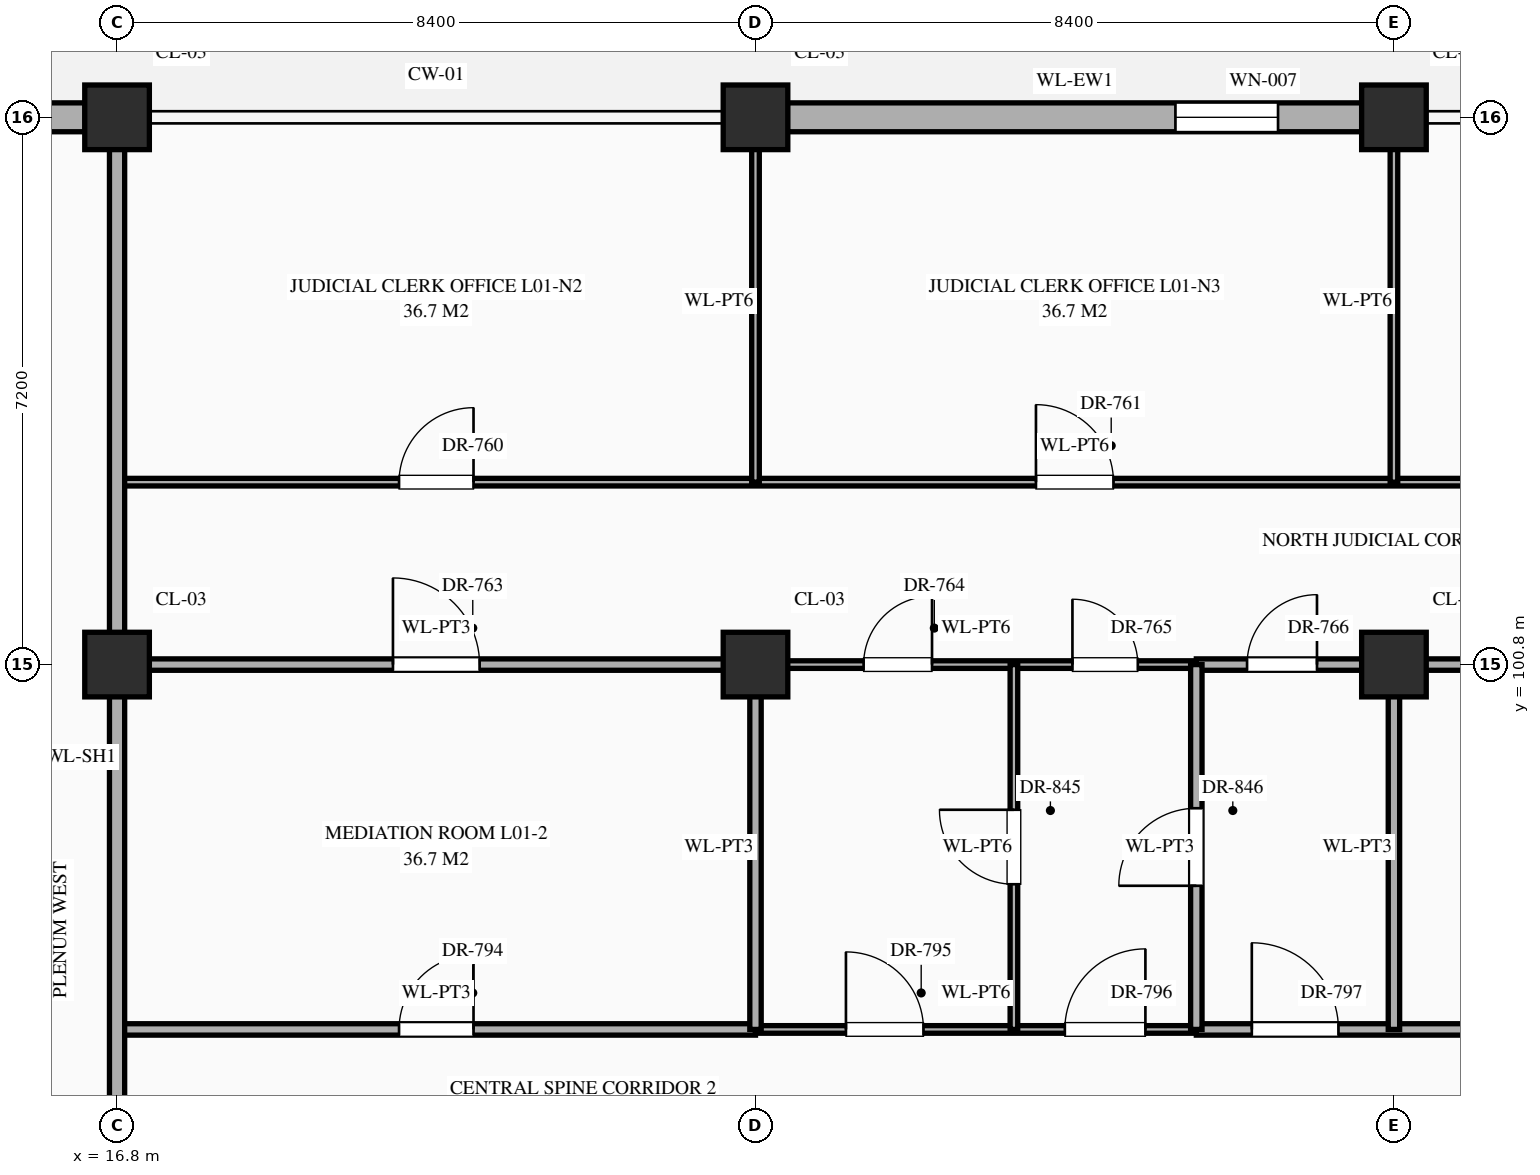
"""IFC4 building model, lengths in metres.
Left out: names, types, materials, properties, quantities, classifications, styles, units other than length and angle.
Written with IfcOpenShell. Run it as: python <this file> out.ifc"""

import sys

from ifc_helpers import new_model, si_unit, direction, frame, frame_2d, origin, origin_2d, place, context, subcontext, project, spatial, rectangle, extrude, element, fill, save


model = new_model("IFC4")
c1 = context("Model", 3, precision=1e-05, world=origin(), true_north=direction((0.0, 1.0)))
c2 = subcontext(c1, "Body", "Model", "MODEL_VIEW")
j1 = project(units=[si_unit("LENGTHUNIT", "METRE"), si_unit("PLANEANGLEUNIT", "RADIAN")], contexts=[c1])
p1 = place(None, origin())
s1 = spatial("IfcSite", under=j1, at=p1, CompositionType="ELEMENT")
p2 = place(p1, origin())
s2 = spatial("IfcBuilding", under=s1, at=p2, CompositionType="ELEMENT")
p3 = place(p2, origin())
s3 = spatial("IfcBuildingStorey", under=s2, at=p3, CompositionType="ELEMENT", Elevation=0.0)
for number, where, z_axis, x_axis in (
    (1, (16.8, 100.8, 0.0), (0.0, 0.0, 1.0), (1.0, 0.0, 0.0)),
    (2, (16.8, 108.0, 0.0), (0.0, 0.0, 1.0), (1.0, 0.0, 0.0)),
    (3, (25.2, 100.8, 0.0), (0.0, 0.0, 1.0), (1.0, 0.0, 0.0)),
    (4, (25.2, 108.0, 0.0), (0.0, 0.0, 1.0), (1.0, 0.0, 0.0)),
    (5, (33.6, 100.8, 0.0), (0.0, 0.0, 1.0), (1.0, 0.0, 0.0)),
    (6, (33.6, 108.0, 0.0), (0.0, 0.0, 1.0), (1.0, 0.0, 0.0)),
):
    element("IfcColumn", number, at=place(p3, frame(where, z_axis=z_axis, x_axis=x_axis)), inside=s3, PredefinedType="COLUMN", context=c2, shape_type="SweptSolid", body=[
        extrude(rectangle(XDim=0.85, YDim=0.85, at=origin_2d()), origin(), (0.0, 0.0, 1.0), 5.4),
    ])
p4 = place(p3, frame((8.82, 108.0, 0.0), z_axis=(0.0, 0.0, 1.0), x_axis=(1.0, 0.0, 0.0)))
e7 = element("IfcWall", 7, at=p4, inside=s3, PredefinedType="STANDARD", context=c2, shape_type="SweptSolid", body=[
    extrude(rectangle(XDim=7.56, YDim=0.38, at=frame_2d((3.78, 0.0))), origin(), (0.0, 0.0, 1.0), 4.47),
])
p5 = place(p4, frame((1.68, 0.0, 0.0)))
e8 = element("IfcOpeningElement", 8, at=p5, cuts=e7, PredefinedType="OPENING", context=c2, shape_type="SweptSolid", body=[
    extrude(rectangle(XDim=4.2, YDim=3.6, at=frame_2d((2.1, 1.8))), frame((0.0, 0.202, 0.0), z_axis=(0.0, -1.0, 0.0), x_axis=(1.0, 0.0, 0.0)), (0.0, 0.0, 1.0), 0.404),
])
p6 = place(p3, frame((25.62, 108.0, 0.0), z_axis=(0.0, 0.0, 1.0), x_axis=(1.0, 0.0, 0.0)))
e9 = element("IfcWall", 9, at=p6, inside=s3, PredefinedType="STANDARD", context=c2, shape_type="SweptSolid", body=[
    extrude(rectangle(XDim=7.56, YDim=0.38, at=frame_2d((3.78, 0.0))), origin(), (0.0, 0.0, 1.0), 4.47),
])
p7 = place(p6, frame((5.105, 0.0, 0.85)))
e10 = element("IfcOpeningElement", 10, at=p7, cuts=e9, PredefinedType="OPENING", context=c2, shape_type="SweptSolid", body=[
    extrude(rectangle(XDim=1.35, YDim=1.56, at=frame_2d((0.675, 0.78))), frame((0.0, 0.202, 0.0), z_axis=(0.0, -1.0, 0.0), x_axis=(1.0, 0.0, 0.0)), (0.0, 0.0, 1.0), 0.404),
])
p8 = place(p3, frame((16.8, 96.0, 0.0), z_axis=(0.0, 0.0, 1.0), x_axis=(1.0, 0.0, 0.0)))
e11 = element("IfcWall", 11, at=p8, inside=s3, PredefinedType="STANDARD", context=c2, shape_type="SweptSolid", body=[
    extrude(rectangle(XDim=8.4, YDim=0.15, at=frame_2d((4.2, 0.0))), origin(), (0.0, 0.0, 1.0), 5.12),
])
p9 = place(p8, frame((3.71, 0.0, 0.0)))
e12 = element("IfcOpeningElement", 12, at=p9, cuts=e11, PredefinedType="OPENING", context=c2, shape_type="SweptSolid", body=[
    extrude(rectangle(XDim=0.98, YDim=2.35, at=frame_2d((0.49, 1.175))), frame((0.0, 0.087, 0.0), z_axis=(0.0, -1.0, 0.0), x_axis=(1.0, 0.0, 0.0)), (0.0, 0.0, 1.0), 0.174),
])
p10 = place(p3, frame((25.2, 96.0, 0.0), z_axis=(0.0, 0.0, 1.0), x_axis=(1.0, 0.0, 0.0)))
e13 = element("IfcWall", 13, at=p10, inside=s3, PredefinedType="STANDARD", context=c2, shape_type="SweptSolid", body=[
    extrude(rectangle(XDim=5.8, YDim=0.1, at=frame_2d((2.9, 0.0))), origin(), (0.0, 0.0, 1.0), 5.12),
])
p11 = place(p10, frame((1.19, 0.0, 0.0)))
e14 = element("IfcOpeningElement", 14, at=p11, cuts=e13, PredefinedType="OPENING", context=c2, shape_type="SweptSolid", body=[
    extrude(rectangle(XDim=1.02, YDim=2.4, at=frame_2d((0.51, 1.2))), frame((0.0, 0.062, 0.0), z_axis=(0.0, -1.0, 0.0), x_axis=(1.0, 0.0, 0.0)), (0.0, 0.0, 1.0), 0.124),
])
p12 = place(p10, frame((4.07, 0.0, 0.0)))
e15 = element("IfcOpeningElement", 15, at=p12, cuts=e13, PredefinedType="OPENING", context=c2, shape_type="SweptSolid", body=[
    extrude(rectangle(XDim=1.06, YDim=2.4, at=frame_2d((0.53, 1.2))), frame((0.0, 0.062, 0.0), z_axis=(0.0, -1.0, 0.0), x_axis=(1.0, 0.0, 0.0)), (0.0, 0.0, 1.0), 0.124),
])
p13 = place(p3, frame((31.0, 96.0, 0.0), z_axis=(0.0, 0.0, 1.0), x_axis=(1.0, 0.0, 0.0)))
e16 = element("IfcWall", 16, at=p13, inside=s3, PredefinedType="STANDARD", context=c2, shape_type="SweptSolid", body=[
    extrude(rectangle(XDim=19.4, YDim=0.15, at=frame_2d((9.7, 0.0))), origin(), (0.0, 0.0, 1.0), 5.12),
])
p14 = place(p13, frame((0.73, 0.0, 0.0)))
e17 = element("IfcOpeningElement", 17, at=p14, cuts=e16, PredefinedType="OPENING", context=c2, shape_type="SweptSolid", body=[
    extrude(rectangle(XDim=1.14, YDim=2.4, at=frame_2d((0.57, 1.2))), frame((0.0, 0.087, 0.0), z_axis=(0.0, -1.0, 0.0), x_axis=(1.0, 0.0, 0.0)), (0.0, 0.0, 1.0), 0.174),
])
p15 = place(p13, frame((6.35, 0.0, 0.0)))
e18 = element("IfcOpeningElement", 18, at=p15, cuts=e16, PredefinedType="OPENING", context=c2, shape_type="SweptSolid", body=[
    extrude(rectangle(XDim=0.9, YDim=2.15, at=frame_2d((0.45, 1.075))), frame((0.0, 0.087, 0.0), z_axis=(0.0, -1.0, 0.0), x_axis=(1.0, 0.0, 0.0)), (0.0, 0.0, 1.0), 0.174),
])
p16 = place(p13, frame((14.77, 0.0, 0.0)))
e19 = element("IfcOpeningElement", 19, at=p16, cuts=e16, PredefinedType="OPENING", context=c2, shape_type="SweptSolid", body=[
    extrude(rectangle(XDim=0.86, YDim=2.1, at=frame_2d((0.43, 1.05))), frame((0.0, 0.087, 0.0), z_axis=(0.0, -1.0, 0.0), x_axis=(1.0, 0.0, 0.0)), (0.0, 0.0, 1.0), 0.174),
])
p17 = place(p3, frame((16.8, 100.8, 0.0), z_axis=(0.0, 0.0, 1.0), x_axis=(1.0, 0.0, 0.0)))
e20 = element("IfcWall", 20, at=p17, inside=s3, PredefinedType="STANDARD", context=c2, shape_type="SweptSolid", body=[
    extrude(rectangle(XDim=8.4, YDim=0.15, at=frame_2d((4.2, 0.0))), origin(), (0.0, 0.0, 1.0), 4.27),
])
p18 = place(p17, frame((3.63, 0.0, 0.0)))
e21 = element("IfcOpeningElement", 21, at=p18, cuts=e20, PredefinedType="OPENING", context=c2, shape_type="SweptSolid", body=[
    extrude(rectangle(XDim=1.14, YDim=2.4, at=frame_2d((0.57, 1.2))), frame((0.0, 0.087, 0.0), z_axis=(0.0, -1.0, 0.0), x_axis=(1.0, 0.0, 0.0)), (0.0, 0.0, 1.0), 0.174),
])
p19 = place(p3, frame((25.2, 100.8, 0.0), z_axis=(0.0, 0.0, 1.0), x_axis=(1.0, 0.0, 0.0)))
e22 = element("IfcWall", 22, at=p19, inside=s3, PredefinedType="STANDARD", context=c2, shape_type="SweptSolid", body=[
    extrude(rectangle(XDim=5.8, YDim=0.1, at=frame_2d((2.9, 0.0))), origin(), (0.0, 0.0, 1.0), 4.27),
])
p20 = place(p19, frame((1.423, 0.0, 0.0)))
e23 = element("IfcOpeningElement", 23, at=p20, cuts=e22, PredefinedType="OPENING", context=c2, shape_type="SweptSolid", body=[
    extrude(rectangle(XDim=0.9, YDim=2.15, at=frame_2d((0.45, 1.075))), frame((0.0, 0.062, 0.0), z_axis=(0.0, -1.0, 0.0), x_axis=(1.0, 0.0, 0.0)), (0.0, 0.0, 1.0), 0.124),
])
p21 = place(p19, frame((4.17, 0.0, 0.0)))
e24 = element("IfcOpeningElement", 24, at=p21, cuts=e22, PredefinedType="OPENING", context=c2, shape_type="SweptSolid", body=[
    extrude(rectangle(XDim=0.86, YDim=2.1, at=frame_2d((0.43, 1.05))), frame((0.0, 0.062, 0.0), z_axis=(0.0, -1.0, 0.0), x_axis=(1.0, 0.0, 0.0)), (0.0, 0.0, 1.0), 0.124),
])
p22 = place(p3, frame((31.0, 100.8, 0.0), z_axis=(0.0, 0.0, 1.0), x_axis=(1.0, 0.0, 0.0)))
e25 = element("IfcWall", 25, at=p22, inside=s3, PredefinedType="STANDARD", context=c2, shape_type="SweptSolid", body=[
    extrude(rectangle(XDim=11.0, YDim=0.15, at=frame_2d((5.5, 0.0))), origin(), (0.0, 0.0, 1.0), 4.27),
])
p23 = place(p22, frame((0.667, 0.0, 0.0)))
e26 = element("IfcOpeningElement", 26, at=p23, cuts=e25, PredefinedType="OPENING", context=c2, shape_type="SweptSolid", body=[
    extrude(rectangle(XDim=0.92, YDim=2.15, at=frame_2d((0.46, 1.075))), frame((0.0, 0.087, 0.0), z_axis=(0.0, -1.0, 0.0), x_axis=(1.0, 0.0, 0.0)), (0.0, 0.0, 1.0), 0.174),
])
p24 = place(p22, frame((6.32, 0.0, 0.0)))
e27 = element("IfcOpeningElement", 27, at=p24, cuts=e25, PredefinedType="OPENING", context=c2, shape_type="SweptSolid", body=[
    extrude(rectangle(XDim=0.96, YDim=2.2, at=frame_2d((0.48, 1.1))), frame((0.0, 0.087, 0.0), z_axis=(0.0, -1.0, 0.0), x_axis=(1.0, 0.0, 0.0)), (0.0, 0.0, 1.0), 0.174),
])
p25 = place(p3, frame((16.8, 103.2, 0.0), z_axis=(0.0, 0.0, 1.0), x_axis=(1.0, 0.0, 0.0)))
e28 = element("IfcWall", 28, at=p25, inside=s3, PredefinedType="STANDARD", context=c2, shape_type="SweptSolid", body=[
    extrude(rectangle(XDim=25.2, YDim=0.1, at=frame_2d((12.6, 0.0))), origin(), (0.0, 0.0, 1.0), 5.12),
])
p26 = place(p25, frame((3.71, 0.0, 0.0)))
e29 = element("IfcOpeningElement", 29, at=p26, cuts=e28, PredefinedType="OPENING", context=c2, shape_type="SweptSolid", body=[
    extrude(rectangle(XDim=0.98, YDim=2.35, at=frame_2d((0.49, 1.175))), frame((0.0, 0.062, 0.0), z_axis=(0.0, -1.0, 0.0), x_axis=(1.0, 0.0, 0.0)), (0.0, 0.0, 1.0), 0.124),
])
p27 = place(p25, frame((12.09, 0.0, 0.0)))
e30 = element("IfcOpeningElement", 30, at=p27, cuts=e28, PredefinedType="OPENING", context=c2, shape_type="SweptSolid", body=[
    extrude(rectangle(XDim=1.02, YDim=2.4, at=frame_2d((0.51, 1.2))), frame((0.0, 0.062, 0.0), z_axis=(0.0, -1.0, 0.0), x_axis=(1.0, 0.0, 0.0)), (0.0, 0.0, 1.0), 0.124),
])
p28 = place(p25, frame((20.47, 0.0, 0.0)))
e31 = element("IfcOpeningElement", 31, at=p28, cuts=e28, PredefinedType="OPENING", context=c2, shape_type="SweptSolid", body=[
    extrude(rectangle(XDim=1.06, YDim=2.4, at=frame_2d((0.53, 1.2))), frame((0.0, 0.062, 0.0), z_axis=(0.0, -1.0, 0.0), x_axis=(1.0, 0.0, 0.0)), (0.0, 0.0, 1.0), 0.124),
])
p29 = place(p3, frame((16.8, 91.2, 0.0), z_axis=(0.0, 0.0, 1.0), x_axis=(0.0, 1.0, 0.0)))
e32 = element("IfcWall", 32, at=p29, inside=s3, PredefinedType="STANDARD", context=c2, shape_type="SweptSolid", body=[
    extrude(rectangle(XDim=16.76, YDim=0.2, at=frame_2d((8.38, 0.0))), origin(), (0.0, 0.0, 1.0), 4.37),
])
p30 = place(p3, frame((25.2, 96.0, 0.0), z_axis=(0.0, 0.0, 1.0), x_axis=(0.0, 1.0, 0.0)))
e33 = element("IfcWall", 33, at=p30, inside=s3, PredefinedType="STANDARD", context=c2, shape_type="SweptSolid", body=[
    extrude(rectangle(XDim=4.8, YDim=0.15, at=frame_2d((2.4, 0.0))), origin(), (0.0, 0.0, 1.0), 4.37),
])
p31 = place(p3, frame((25.2, 103.2, 0.0), z_axis=(0.0, 0.0, 1.0), x_axis=(0.0, 1.0, 0.0)))
e34 = element("IfcWall", 34, at=p31, inside=s3, PredefinedType="STANDARD", context=c2, shape_type="SweptSolid", body=[
    extrude(rectangle(XDim=4.76, YDim=0.1, at=frame_2d((2.38, 0.0))), origin(), (0.0, 0.0, 1.0), 4.37),
])
p32 = place(p3, frame((28.6, 96.0, 0.0), z_axis=(0.0, 0.0, 1.0), x_axis=(0.0, 1.0, 0.0)))
e35 = element("IfcWall", 35, at=p32, inside=s3, PredefinedType="STANDARD", context=c2, shape_type="SweptSolid", body=[
    extrude(rectangle(XDim=4.8, YDim=0.1, at=frame_2d((2.4, 0.0))), origin(), (0.0, 0.0, 1.0), 5.12),
])
p33 = place(p32, frame((1.91, 0.0, 0.0)))
e36 = element("IfcOpeningElement", 36, at=p33, cuts=e35, PredefinedType="OPENING", context=c2, shape_type="SweptSolid", body=[
    extrude(rectangle(XDim=0.98, YDim=2.35, at=frame_2d((0.49, 1.175))), frame((0.0, 0.062, 0.0), z_axis=(0.0, -1.0, 0.0), x_axis=(1.0, 0.0, 0.0)), (0.0, 0.0, 1.0), 0.124),
])
p34 = place(p3, frame((31.0, 96.0, 0.0), z_axis=(0.0, 0.0, 1.0), x_axis=(0.0, 1.0, 0.0)))
e37 = element("IfcWall", 37, at=p34, inside=s3, PredefinedType="STANDARD", context=c2, shape_type="SweptSolid", body=[
    extrude(rectangle(XDim=4.8, YDim=0.15, at=frame_2d((2.4, 0.0))), origin(), (0.0, 0.0, 1.0), 5.12),
])
p35 = place(p34, frame((1.89, 0.0, 0.0)))
e38 = element("IfcOpeningElement", 38, at=p35, cuts=e37, PredefinedType="OPENING", context=c2, shape_type="SweptSolid", body=[
    extrude(rectangle(XDim=1.02, YDim=2.4, at=frame_2d((0.51, 1.2))), frame((0.0, 0.087, 0.0), z_axis=(0.0, -1.0, 0.0), x_axis=(1.0, 0.0, 0.0)), (0.0, 0.0, 1.0), 0.174),
])
p36 = place(p3, frame((33.6, 96.0, 0.0), z_axis=(0.0, 0.0, 1.0), x_axis=(0.0, 1.0, 0.0)))
e39 = element("IfcWall", 39, at=p36, inside=s3, PredefinedType="STANDARD", context=c2, shape_type="SweptSolid", body=[
    extrude(rectangle(XDim=4.8, YDim=0.15, at=frame_2d((2.4, 0.0))), origin(), (0.0, 0.0, 1.0), 4.37),
])
p37 = place(p3, frame((33.6, 103.2, 0.0), z_axis=(0.0, 0.0, 1.0), x_axis=(0.0, 1.0, 0.0)))
e40 = element("IfcWall", 40, at=p37, inside=s3, PredefinedType="STANDARD", context=c2, shape_type="SweptSolid", body=[
    extrude(rectangle(XDim=4.76, YDim=0.1, at=frame_2d((2.38, 0.0))), origin(), (0.0, 0.0, 1.0), 4.37),
])
p38 = place(p7, origin())
e41 = element("IfcWindow", 41, at=p38, inside=s3, PartitioningType="SINGLE_PANEL", PredefinedType="WINDOW", context=c2, shape_type="SweptSolid", body=[
    extrude(rectangle(XDim=1.35, YDim=1.56, at=frame_2d((0.675, 0.78))), frame((0.0, 0.03, 0.0), z_axis=(0.0, -1.0, 0.0), x_axis=(1.0, 0.0, 0.0)), (0.0, 0.0, 1.0), 0.06),
])
fill(e10, e41)
p39 = place(p26, origin())
e42 = element("IfcDoor", 42, at=p39, inside=s3, OperationType="SINGLE_SWING_RIGHT", PredefinedType="DOOR", context=c2, shape_type="SweptSolid", body=[
    extrude(rectangle(XDim=0.98, YDim=2.35, at=frame_2d((0.49, 1.175))), frame((0.0, 0.025, 0.0), z_axis=(0.0, -1.0, 0.0), x_axis=(1.0, 0.0, 0.0)), (0.0, 0.0, 1.0), 0.05),
])
fill(e29, e42)
p40 = place(p27, origin())
e43 = element("IfcDoor", 43, at=p40, inside=s3, OperationType="SINGLE_SWING_LEFT", PredefinedType="DOOR", context=c2, shape_type="SweptSolid", body=[
    extrude(rectangle(XDim=1.02, YDim=2.4, at=frame_2d((0.51, 1.2))), frame((0.0, 0.025, 0.0), z_axis=(0.0, -1.0, 0.0), x_axis=(1.0, 0.0, 0.0)), (0.0, 0.0, 1.0), 0.05),
])
fill(e30, e43)
p41 = place(p18, origin())
e44 = element("IfcDoor", 44, at=p41, inside=s3, OperationType="SINGLE_SWING_LEFT", PredefinedType="DOOR", context=c2, shape_type="SweptSolid", body=[
    extrude(rectangle(XDim=1.14, YDim=2.4, at=frame_2d((0.57, 1.2))), frame((0.0, 0.025, 0.0), z_axis=(0.0, -1.0, 0.0), x_axis=(1.0, 0.0, 0.0)), (0.0, 0.0, 1.0), 0.05),
])
fill(e21, e44)
p42 = place(p20, origin())
e45 = element("IfcDoor", 45, at=p42, inside=s3, OperationType="SINGLE_SWING_RIGHT", PredefinedType="DOOR", context=c2, shape_type="SweptSolid", body=[
    extrude(rectangle(XDim=0.9, YDim=2.15, at=frame_2d((0.45, 1.075))), frame((0.0, 0.025, 0.0), z_axis=(0.0, -1.0, 0.0), x_axis=(1.0, 0.0, 0.0)), (0.0, 0.0, 1.0), 0.05),
])
fill(e23, e45)
p43 = place(p21, origin())
e46 = element("IfcDoor", 46, at=p43, inside=s3, OperationType="SINGLE_SWING_LEFT", PredefinedType="DOOR", context=c2, shape_type="SweptSolid", body=[
    extrude(rectangle(XDim=0.86, YDim=2.1, at=frame_2d((0.43, 1.05))), frame((0.0, 0.025, 0.0), z_axis=(0.0, -1.0, 0.0), x_axis=(1.0, 0.0, 0.0)), (0.0, 0.0, 1.0), 0.05),
])
fill(e24, e46)
p44 = place(p23, origin())
e47 = element("IfcDoor", 47, at=p44, inside=s3, OperationType="SINGLE_SWING_RIGHT", PredefinedType="DOOR", context=c2, shape_type="SweptSolid", body=[
    extrude(rectangle(XDim=0.92, YDim=2.15, at=frame_2d((0.46, 1.075))), frame((0.0, 0.025, 0.0), z_axis=(0.0, -1.0, 0.0), x_axis=(1.0, 0.0, 0.0)), (0.0, 0.0, 1.0), 0.05),
])
fill(e26, e47)
p45 = place(p9, origin())
e48 = element("IfcDoor", 48, at=p45, inside=s3, OperationType="SINGLE_SWING_RIGHT", PredefinedType="DOOR", context=c2, shape_type="SweptSolid", body=[
    extrude(rectangle(XDim=0.98, YDim=2.35, at=frame_2d((0.49, 1.175))), frame((0.0, 0.025, 0.0), z_axis=(0.0, -1.0, 0.0), x_axis=(1.0, 0.0, 0.0)), (0.0, 0.0, 1.0), 0.05),
])
fill(e12, e48)
p46 = place(p11, origin())
e49 = element("IfcDoor", 49, at=p46, inside=s3, OperationType="SINGLE_SWING_LEFT", PredefinedType="DOOR", context=c2, shape_type="SweptSolid", body=[
    extrude(rectangle(XDim=1.02, YDim=2.4, at=frame_2d((0.51, 1.2))), frame((0.0, 0.025, 0.0), z_axis=(0.0, -1.0, 0.0), x_axis=(1.0, 0.0, 0.0)), (0.0, 0.0, 1.0), 0.05),
])
fill(e14, e49)
p47 = place(p12, origin())
e50 = element("IfcDoor", 50, at=p47, inside=s3, OperationType="SINGLE_SWING_RIGHT", PredefinedType="DOOR", context=c2, shape_type="SweptSolid", body=[
    extrude(rectangle(XDim=1.06, YDim=2.4, at=frame_2d((0.53, 1.2))), frame((0.0, 0.025, 0.0), z_axis=(0.0, -1.0, 0.0), x_axis=(1.0, 0.0, 0.0)), (0.0, 0.0, 1.0), 0.05),
])
fill(e15, e50)
p48 = place(p14, origin())
e51 = element("IfcDoor", 51, at=p48, inside=s3, OperationType="SINGLE_SWING_LEFT", PredefinedType="DOOR", context=c2, shape_type="SweptSolid", body=[
    extrude(rectangle(XDim=1.14, YDim=2.4, at=frame_2d((0.57, 1.2))), frame((0.0, 0.025, 0.0), z_axis=(0.0, -1.0, 0.0), x_axis=(1.0, 0.0, 0.0)), (0.0, 0.0, 1.0), 0.05),
])
fill(e17, e51)
p49 = place(p33, origin())
e52 = element("IfcDoor", 52, at=p49, inside=s3, OperationType="SINGLE_SWING_RIGHT", PredefinedType="DOOR", context=c2, shape_type="SweptSolid", body=[
    extrude(rectangle(XDim=0.98, YDim=2.35, at=frame_2d((0.49, 1.175))), frame((0.0, 0.025, 0.0), z_axis=(0.0, -1.0, 0.0), x_axis=(1.0, 0.0, 0.0)), (0.0, 0.0, 1.0), 0.05),
])
fill(e36, e52)
p50 = place(p35, origin())
e53 = element("IfcDoor", 53, at=p50, inside=s3, OperationType="SINGLE_SWING_LEFT", PredefinedType="DOOR", context=c2, shape_type="SweptSolid", body=[
    extrude(rectangle(XDim=1.02, YDim=2.4, at=frame_2d((0.51, 1.2))), frame((0.0, 0.025, 0.0), z_axis=(0.0, -1.0, 0.0), x_axis=(1.0, 0.0, 0.0)), (0.0, 0.0, 1.0), 0.05),
])
fill(e38, e53)
save(model, sys.argv[1])
